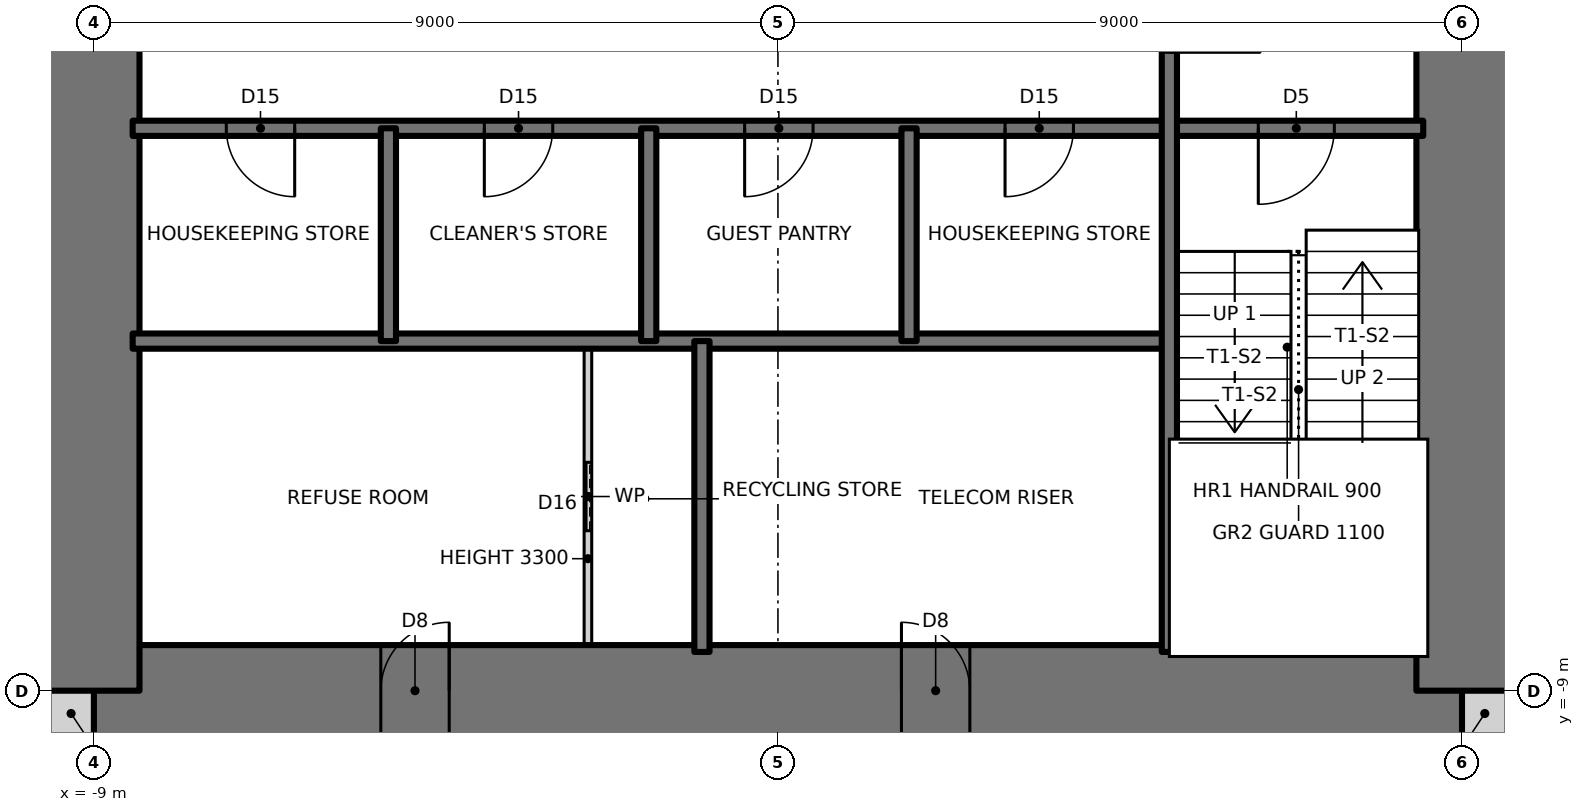
"""IFC4 building model, lengths in metres.
Left out: names, types, materials, properties, quantities, classifications, styles, units other than length and angle.
Written with IfcOpenShell. Run it as: python <this file> out.ifc"""

import sys

from ifc_helpers import new_model, si_unit, direction, frame, frame_2d, origin, place, context, subcontext, project, spatial, rectangle, extrude, element, fill, save


model = new_model("IFC4")
c1 = context("Model", 3, precision=1e-05, world=origin(), true_north=direction((0.0, 1.0)))
c2 = subcontext(c1, "Body", "Model", "MODEL_VIEW")
j1 = project(units=[si_unit("LENGTHUNIT", "METRE"), si_unit("PLANEANGLEUNIT", "RADIAN")], contexts=[c1])
p1 = place(None, origin())
s1 = spatial("IfcSite", under=j1, at=p1, CompositionType="ELEMENT")
p2 = place(p1, origin())
s2 = spatial("IfcBuilding", under=s1, at=p2, CompositionType="ELEMENT")
p3 = place(p2, frame((0.0, 0.0, 156.5)))
s3 = spatial("IfcBuildingStorey", under=s2, at=p3, CompositionType="ELEMENT", Elevation=156.5)
for number, where, z_axis, x_axis in (
    (1, (-9.6, -9.3, 0.0), (0.0, 0.0, 1.0), (1.0, 0.0, 0.0)),
    (2, (9.0, -9.3, 0.0), (0.0, 0.0, 1.0), (1.0, 0.0, 0.0)),
):
    element("IfcWall", number, at=place(p3, frame(where, z_axis=z_axis, x_axis=x_axis)), inside=s3, PredefinedType="SOLIDWALL", context=c2, shape_type="SweptSolid", body=[
        extrude(rectangle(XDim=0.6, YDim=0.6, at=frame_2d((0.3, 0.0))), origin(), (0.0, 0.0, 1.0), 3.5),
    ])
p4 = place(p3, frame((-9.0, -9.0, 0.0), z_axis=(0.0, 0.0, 1.0), x_axis=(1.0, 0.0, 0.0)))
e3 = element("IfcWall", 3, at=p4, inside=s3, PredefinedType="SHEAR", context=c2, shape_type="SweptSolid", body=[
    extrude(rectangle(XDim=18.0, YDim=1.2, at=frame_2d((9.0, 0.0))), origin(), (0.0, 0.0, 1.0), 3.5),
])
p5 = place(p4, frame((3.775, 0.0, 0.0)))
e4 = element("IfcOpeningElement", 4, at=p5, cuts=e3, PredefinedType="OPENING", context=c2, shape_type="SweptSolid", body=[
    extrude(rectangle(XDim=0.9, YDim=2.1, at=frame_2d((0.45, 1.05))), frame((0.0, 0.61, 0.0), z_axis=(0.0, -1.0, 0.0), x_axis=(1.0, 0.0, 0.0)), (0.0, 0.0, 1.0), 1.22),
])
p6 = place(p4, frame((10.625, 0.0, 0.0)))
e5 = element("IfcOpeningElement", 5, at=p6, cuts=e3, PredefinedType="OPENING", context=c2, shape_type="SweptSolid", body=[
    extrude(rectangle(XDim=0.9, YDim=2.1, at=frame_2d((0.45, 1.05))), frame((0.0, 0.61, 0.0), z_axis=(0.0, -1.0, 0.0), x_axis=(1.0, 0.0, 0.0)), (0.0, 0.0, 1.0), 1.22),
])
p7 = place(p3, frame((9.0, -9.0, 0.0), z_axis=(0.0, 0.0, 1.0), x_axis=(0.0, 1.0, 0.0)))
e6 = element("IfcWall", 6, at=p7, inside=s3, PredefinedType="SHEAR", context=c2, shape_type="SweptSolid", body=[
    extrude(rectangle(XDim=18.0, YDim=1.2, at=frame_2d((9.0, 0.0))), origin(), (0.0, 0.0, 1.0), 3.5),
])
p8 = place(p7, frame((8.5, 0.0, 0.0)))
e7 = element("IfcOpeningElement", 7, at=p8, cuts=e6, PredefinedType="OPENING", context=c2, shape_type="SweptSolid", body=[
    extrude(rectangle(XDim=1.0, YDim=2.1, at=frame_2d((0.5, 1.05))), frame((0.0, 0.61, 0.0), z_axis=(0.0, -1.0, 0.0), x_axis=(1.0, 0.0, 0.0)), (0.0, 0.0, 1.0), 1.22),
])
p9 = place(p3, frame((-9.0, 9.0, 0.0), z_axis=(0.0, 0.0, 1.0), x_axis=(0.0, -1.0, 0.0)))
e8 = element("IfcWall", 8, at=p9, inside=s3, PredefinedType="SHEAR", context=c2, shape_type="SweptSolid", body=[
    extrude(rectangle(XDim=18.0, YDim=1.2, at=frame_2d((9.0, 0.0))), origin(), (0.0, 0.0, 1.0), 3.5),
])
p10 = place(p9, frame((8.5, 0.0, 0.0)))
e9 = element("IfcOpeningElement", 9, at=p10, cuts=e8, PredefinedType="OPENING", context=c2, shape_type="SweptSolid", body=[
    extrude(rectangle(XDim=1.0, YDim=2.1, at=frame_2d((0.5, 1.05))), frame((0.0, 0.61, 0.0), z_axis=(0.0, -1.0, 0.0), x_axis=(1.0, 0.0, 0.0)), (0.0, 0.0, 1.0), 1.22),
])
p11 = place(p3, frame((-8.49, -4.4, 0.0), z_axis=(0.0, 0.0, 1.0), x_axis=(1.0, 0.0, 0.0)))
e10 = element("IfcWall", 10, at=p11, inside=s3, PredefinedType="SOLIDWALL", context=c2, shape_type="SweptSolid", body=[
    extrude(rectangle(XDim=13.64, YDim=0.2, at=frame_2d((6.82, 0.0))), origin(), (0.0, 0.0, 1.0), 3.5),
])
p12 = place(p3, frame((-8.49, -1.6, 0.0), z_axis=(0.0, 0.0, 1.0), x_axis=(1.0, 0.0, 0.0)))
e11 = element("IfcWall", 11, at=p12, inside=s3, PredefinedType="SOLIDWALL", context=c2, shape_type="SweptSolid", body=[
    extrude(rectangle(XDim=16.98, YDim=0.2, at=frame_2d((8.49, 0.0))), origin(), (0.0, 0.0, 1.0), 3.5),
])
p13 = place(p12, frame((14.81, 0.0, 0.0)))
e12 = element("IfcOpeningElement", 12, at=p13, cuts=e11, PredefinedType="OPENING", context=c2, shape_type="SweptSolid", body=[
    extrude(rectangle(XDim=1.0, YDim=2.1, at=frame_2d((0.5, 1.05))), frame((0.0, 0.11, 0.0), z_axis=(0.0, -1.0, 0.0), x_axis=(1.0, 0.0, 0.0)), (0.0, 0.0, 1.0), 0.22),
])
p14 = place(p12, frame((1.232, 0.0, 0.0)))
e13 = element("IfcOpeningElement", 13, at=p14, cuts=e11, PredefinedType="OPENING", context=c2, shape_type="SweptSolid", body=[
    extrude(rectangle(XDim=0.9, YDim=2.1, at=frame_2d((0.45, 1.05))), frame((0.0, 0.11, 0.0), z_axis=(0.0, -1.0, 0.0), x_axis=(1.0, 0.0, 0.0)), (0.0, 0.0, 1.0), 0.22),
])
p15 = place(p12, frame((4.627, 0.0, 0.0)))
e14 = element("IfcOpeningElement", 14, at=p15, cuts=e11, PredefinedType="OPENING", context=c2, shape_type="SweptSolid", body=[
    extrude(rectangle(XDim=0.9, YDim=2.1, at=frame_2d((0.45, 1.05))), frame((0.0, 0.11, 0.0), z_axis=(0.0, -1.0, 0.0), x_axis=(1.0, 0.0, 0.0)), (0.0, 0.0, 1.0), 0.22),
])
p16 = place(p12, frame((8.052, 0.0, 0.0)))
e15 = element("IfcOpeningElement", 15, at=p16, cuts=e11, PredefinedType="OPENING", context=c2, shape_type="SweptSolid", body=[
    extrude(rectangle(XDim=0.9, YDim=2.1, at=frame_2d((0.45, 1.05))), frame((0.0, 0.11, 0.0), z_axis=(0.0, -1.0, 0.0), x_axis=(1.0, 0.0, 0.0)), (0.0, 0.0, 1.0), 0.22),
])
p17 = place(p12, frame((11.478, 0.0, 0.0)))
e16 = element("IfcOpeningElement", 16, at=p17, cuts=e11, PredefinedType="OPENING", context=c2, shape_type="SweptSolid", body=[
    extrude(rectangle(XDim=0.9, YDim=2.1, at=frame_2d((0.45, 1.05))), frame((0.0, 0.11, 0.0), z_axis=(0.0, -1.0, 0.0), x_axis=(1.0, 0.0, 0.0)), (0.0, 0.0, 1.0), 0.22),
])
p18 = place(p3, frame((5.15, -8.49, 0.0), z_axis=(0.0, 0.0, 1.0), x_axis=(0.0, 1.0, 0.0)))
e17 = element("IfcWall", 17, at=p18, inside=s3, PredefinedType="SOLIDWALL", context=c2, shape_type="SweptSolid", body=[
    extrude(rectangle(XDim=13.09, YDim=0.2, at=frame_2d((6.545, 0.0))), origin(), (0.0, 0.0, 1.0), 3.5),
])
p19 = place(p18, frame((7.89, 0.0, 0.0)))
e18 = element("IfcOpeningElement", 18, at=p19, cuts=e17, PredefinedType="OPENING", context=c2, shape_type="SweptSolid", body=[
    extrude(rectangle(XDim=1.2, YDim=2.1, at=frame_2d((0.6, 1.05))), frame((0.0, 0.11, 0.0), z_axis=(0.0, -1.0, 0.0), x_axis=(1.0, 0.0, 0.0)), (0.0, 0.0, 1.0), 0.22),
])
p20 = place(p3, frame((1.725, -4.4, 0.0), z_axis=(0.0, 0.0, 1.0), x_axis=(0.0, 1.0, 0.0)))
e19 = element("IfcWall", 19, at=p20, inside=s3, PredefinedType="SOLIDWALL", context=c2, shape_type="SweptSolid", body=[
    extrude(rectangle(XDim=2.8, YDim=0.2, at=frame_2d((1.4, 0.0))), origin(), (0.0, 0.0, 1.0), 3.5),
])
p21 = place(p3, frame((-1.0, -8.49, 0.0), z_axis=(0.0, 0.0, 1.0), x_axis=(0.0, 1.0, 0.0)))
e20 = element("IfcWall", 20, at=p21, inside=s3, PredefinedType="SOLIDWALL", context=c2, shape_type="SweptSolid", body=[
    extrude(rectangle(XDim=4.09, YDim=0.2, at=frame_2d((2.045, 0.0))), origin(), (0.0, 0.0, 1.0), 3.5),
])
p22 = place(p3, frame((-1.7, -4.4, 0.0), z_axis=(0.0, 0.0, 1.0), x_axis=(0.0, 1.0, 0.0)))
e21 = element("IfcWall", 21, at=p22, inside=s3, PredefinedType="SOLIDWALL", context=c2, shape_type="SweptSolid", body=[
    extrude(rectangle(XDim=2.8, YDim=0.2, at=frame_2d((1.4, 0.0))), origin(), (0.0, 0.0, 1.0), 3.5),
])
p23 = place(p3, frame((-2.5, -8.49, 0.0), z_axis=(0.0, 0.0, 1.0), x_axis=(0.0, 1.0, 0.0)))
e22 = element("IfcWall", 22, at=p23, inside=s3, PredefinedType="PARTITIONING", context=c2, shape_type="SweptSolid", body=[
    extrude(rectangle(XDim=4.09, YDim=0.1, at=frame_2d((2.045, 0.0))), origin(), (0.0, 0.0, 1.0), 3.3),
])
p24 = place(p23, frame((1.595, 0.0, 0.0)))
e23 = element("IfcOpeningElement", 23, at=p24, cuts=e22, PredefinedType="OPENING", context=c2, shape_type="SweptSolid", body=[
    extrude(rectangle(XDim=0.9, YDim=2.1, at=frame_2d((0.45, 1.05))), frame((0.0, 0.06, 0.0), z_axis=(0.0, -1.0, 0.0), x_axis=(1.0, 0.0, 0.0)), (0.0, 0.0, 1.0), 0.12),
])
p25 = place(p3, frame((-5.125, -4.4, 0.0), z_axis=(0.0, 0.0, 1.0), x_axis=(0.0, 1.0, 0.0)))
e24 = element("IfcWall", 24, at=p25, inside=s3, PredefinedType="SOLIDWALL", context=c2, shape_type="SweptSolid", body=[
    extrude(rectangle(XDim=2.8, YDim=0.2, at=frame_2d((1.4, 0.0))), origin(), (0.0, 0.0, 1.0), 3.5),
])
p26 = place(p13, frame((1.0, 0.0, 0.0), z_axis=(0.0, 0.0, 1.0), x_axis=(-1.0, 0.0, 0.0)))
e25 = element("IfcDoor", 25, at=p26, inside=s3, OperationType="SINGLE_SWING_RIGHT", PredefinedType="DOOR", context=c2, shape_type="SweptSolid", body=[
    extrude(rectangle(XDim=1.0, YDim=2.1, at=frame_2d((0.5, 1.05))), frame((0.0, 0.025, 0.0), z_axis=(0.0, -1.0, 0.0), x_axis=(1.0, 0.0, 0.0)), (0.0, 0.0, 1.0), 0.05),
])
fill(e12, e25)
p27 = place(p19, frame((1.2, 0.0, 0.0), z_axis=(0.0, 0.0, 1.0), x_axis=(-1.0, 0.0, 0.0)))
e26 = element("IfcDoor", 26, at=p27, inside=s3, OperationType="SINGLE_SWING_RIGHT", PredefinedType="DOOR", context=c2, shape_type="SweptSolid", body=[
    extrude(rectangle(XDim=1.2, YDim=2.1, at=frame_2d((0.6, 1.05))), frame((0.0, 0.025, 0.0), z_axis=(0.0, -1.0, 0.0), x_axis=(1.0, 0.0, 0.0)), (0.0, 0.0, 1.0), 0.05),
])
fill(e18, e26)
p28 = place(p14, frame((0.9, 0.0, 0.0), z_axis=(0.0, 0.0, 1.0), x_axis=(-1.0, 0.0, 0.0)))
e27 = element("IfcDoor", 27, at=p28, inside=s3, OperationType="SINGLE_SWING_LEFT", PredefinedType="DOOR", context=c2, shape_type="SweptSolid", body=[
    extrude(rectangle(XDim=0.9, YDim=2.1, at=frame_2d((0.45, 1.05))), frame((0.0, 0.025, 0.0), z_axis=(0.0, -1.0, 0.0), x_axis=(1.0, 0.0, 0.0)), (0.0, 0.0, 1.0), 0.05),
])
fill(e13, e27)
p29 = place(p15, frame((0.9, 0.0, 0.0), z_axis=(0.0, 0.0, 1.0), x_axis=(-1.0, 0.0, 0.0)))
e28 = element("IfcDoor", 28, at=p29, inside=s3, OperationType="SINGLE_SWING_RIGHT", PredefinedType="DOOR", context=c2, shape_type="SweptSolid", body=[
    extrude(rectangle(XDim=0.9, YDim=2.1, at=frame_2d((0.45, 1.05))), frame((0.0, 0.025, 0.0), z_axis=(0.0, -1.0, 0.0), x_axis=(1.0, 0.0, 0.0)), (0.0, 0.0, 1.0), 0.05),
])
fill(e14, e28)
p30 = place(p16, frame((0.9, 0.0, 0.0), z_axis=(0.0, 0.0, 1.0), x_axis=(-1.0, 0.0, 0.0)))
e29 = element("IfcDoor", 29, at=p30, inside=s3, OperationType="SINGLE_SWING_RIGHT", PredefinedType="DOOR", context=c2, shape_type="SweptSolid", body=[
    extrude(rectangle(XDim=0.9, YDim=2.1, at=frame_2d((0.45, 1.05))), frame((0.0, 0.025, 0.0), z_axis=(0.0, -1.0, 0.0), x_axis=(1.0, 0.0, 0.0)), (0.0, 0.0, 1.0), 0.05),
])
fill(e15, e29)
p31 = place(p17, frame((0.9, 0.0, 0.0), z_axis=(0.0, 0.0, 1.0), x_axis=(-1.0, 0.0, 0.0)))
e30 = element("IfcDoor", 30, at=p31, inside=s3, OperationType="SINGLE_SWING_RIGHT", PredefinedType="DOOR", context=c2, shape_type="SweptSolid", body=[
    extrude(rectangle(XDim=0.9, YDim=2.1, at=frame_2d((0.45, 1.05))), frame((0.0, 0.025, 0.0), z_axis=(0.0, -1.0, 0.0), x_axis=(1.0, 0.0, 0.0)), (0.0, 0.0, 1.0), 0.05),
])
fill(e16, e30)
p32 = place(p24, origin())
e31 = element("IfcDoor", 31, at=p32, inside=s3, OperationType="SLIDING_TO_LEFT", PredefinedType="DOOR", context=c2, shape_type="SweptSolid", body=[
    extrude(rectangle(XDim=0.9, YDim=2.1, at=frame_2d((0.45, 1.05))), frame((0.0, 0.025, 0.0), z_axis=(0.0, -1.0, 0.0), x_axis=(1.0, 0.0, 0.0)), (0.0, 0.0, 1.0), 0.05),
])
fill(e23, e31)
p33 = place(p5, origin())
e32 = element("IfcDoor", 32, at=p33, inside=s3, OperationType="SINGLE_SWING_RIGHT", PredefinedType="DOOR", context=c2, shape_type="SweptSolid", body=[
    extrude(rectangle(XDim=0.9, YDim=2.1, at=frame_2d((0.45, 1.05))), frame((0.0, 0.025, 0.0), z_axis=(0.0, -1.0, 0.0), x_axis=(1.0, 0.0, 0.0)), (0.0, 0.0, 1.0), 0.05),
])
fill(e4, e32)
p34 = place(p6, origin())
e33 = element("IfcDoor", 33, at=p34, inside=s3, OperationType="SINGLE_SWING_LEFT", PredefinedType="DOOR", context=c2, shape_type="SweptSolid", body=[
    extrude(rectangle(XDim=0.9, YDim=2.1, at=frame_2d((0.45, 1.05))), frame((0.0, 0.025, 0.0), z_axis=(0.0, -1.0, 0.0), x_axis=(1.0, 0.0, 0.0)), (0.0, 0.0, 1.0), 0.05),
])
fill(e5, e33)
save(model, sys.argv[1])
